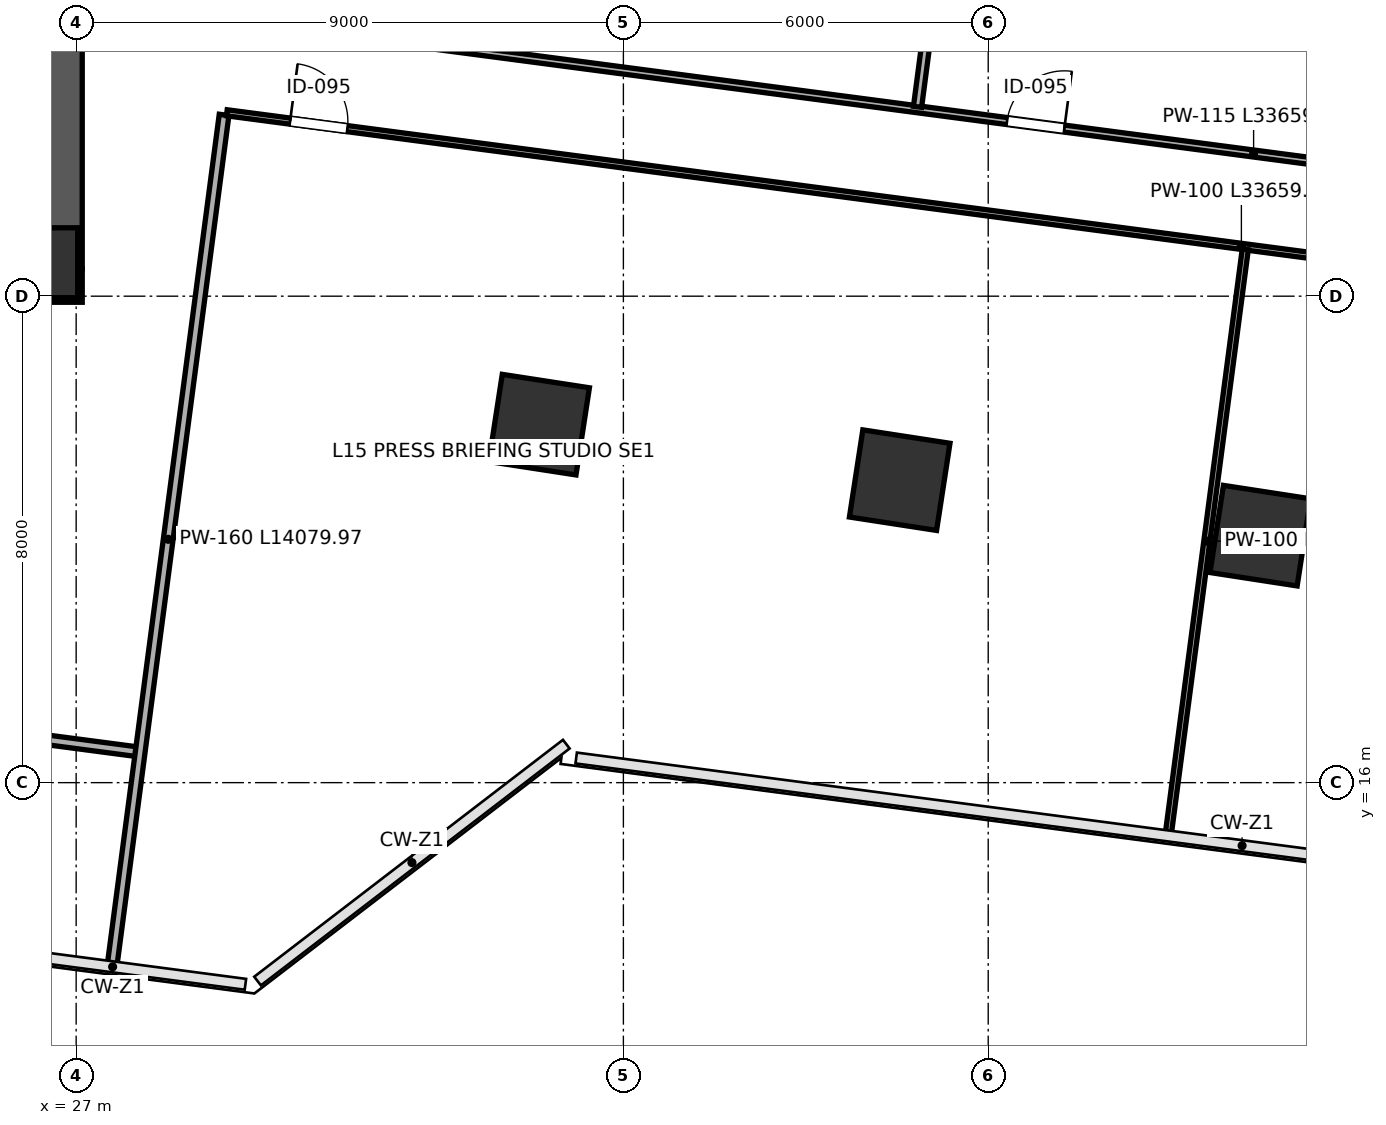
"""IFC4 building model, lengths in metres.
Left out: names, types, materials, properties, quantities, classifications, styles, units other than length and angle.
Written with IfcOpenShell. Run it as: python <this file> out.ifc"""

import sys

from ifc_helpers import new_model, si_unit, direction, frame, frame_2d, origin, origin_2d, place, context, subcontext, project, spatial, rectangle, extrude, clip, halfspace, source, transform, mapped, element, fill, save


model = new_model("IFC4")
c1 = context("Model", 3, precision=1e-05, world=origin(), true_north=direction((0.0, 1.0)))
c2 = subcontext(c1, "Body", "Model", "MODEL_VIEW")
j1 = project(units=[si_unit("LENGTHUNIT", "METRE"), si_unit("PLANEANGLEUNIT", "RADIAN")], contexts=[c1])
p1 = place(None, origin())
s1 = spatial("IfcSite", under=j1, at=p1, CompositionType="ELEMENT")
p2 = place(p1, origin())
s2 = spatial("IfcBuilding", under=s1, at=p2, CompositionType="ELEMENT")
p3 = place(p2, frame((0.0, 0.0, 70.6)))
s3 = spatial("IfcBuildingStorey", under=s2, at=p3, CompositionType="ELEMENT", Elevation=70.6)
m1 = source(origin(), c2, "Body", "SweptSolid", [
    extrude(rectangle(XDim=1.15, YDim=1.15, at=origin_2d()), origin(), (0.0, 0.0, 1.0), 4.198),
])
p4 = place(p3, frame((26.45, 24.55, 0.001), z_axis=(0.0, 0.0, 1.0), x_axis=(1.0, 0.0, 0.0)))
e1 = element("IfcColumn", 1, at=p4, inside=s3, PredefinedType="COLUMN", context=c2, shape_type="MappedRepresentation", body=[
    mapped(m1, transform((0.0, 0.0, 0.0), scale=1.0)),
])
p5 = place(p3, frame((34.614, 21.887, 0.0), z_axis=(-0.053108414123, -0.067297685072, 0.99631848218), x_axis=(-0.681975421827, 0.731258809044, 0.013041404074)))
e2 = element("IfcColumn", 2, at=p5, inside=s3, PredefinedType="COLUMN", context=c2, shape_type="Clipping", body=[
    clip(clip(extrude(rectangle(XDim=1.45, YDim=1.45, at=origin_2d()), origin(), (0.0, 0.0, 1.0), 4.216), halfspace(frame((0.0, 0.0, 0.072), z_axis=(0.0, 0.0, -1.0), x_axis=(1.0, 0.0, 0.0)), False)), halfspace(frame((0.0, 0.0, 4.144), z_axis=(0.0, 0.0, 1.0), x_axis=(1.0, 0.0, 0.0)), False)),
])
p6 = place(p3, frame((40.544, 20.975, 0.0), z_axis=(-0.057984263369, -0.097660746371, 0.993529166064), x_axis=(-0.772693676035, 0.634543900817, 0.017277758853)))
e3 = element("IfcColumn", 3, at=p6, inside=s3, PredefinedType="COLUMN", context=c2, shape_type="Clipping", body=[
    clip(clip(extrude(rectangle(XDim=1.45, YDim=1.45, at=origin_2d()), origin(), (0.0, 0.0, 1.0), 4.227), halfspace(frame((0.0, 0.0, 0.095), z_axis=(0.0, 0.0, -1.0), x_axis=(1.0, 0.0, 0.0)), False)), halfspace(frame((0.0, 0.0, 4.132), z_axis=(0.0, 0.0, 1.0), x_axis=(1.0, 0.0, 0.0)), False)),
])
p7 = place(p3, frame((46.475, 20.062, 0.0), z_axis=(-0.06277402471, -0.127676957682, 0.98982726589), x_axis=(-0.820518646619, 0.571209874027, 0.021643252166)))
e4 = element("IfcColumn", 4, at=p7, inside=s3, PredefinedType="COLUMN", context=c2, shape_type="Clipping", body=[
    clip(clip(extrude(rectangle(XDim=1.45, YDim=1.45, at=origin_2d()), origin(), (0.0, 0.0, 1.0), 4.243), halfspace(frame((0.0, 0.0, 0.12), z_axis=(0.0, 0.0, -1.0), x_axis=(1.0, 0.0, 0.0)), False)), halfspace(frame((0.0, 0.0, 4.124), z_axis=(0.0, 0.0, 1.0), x_axis=(1.0, 0.0, 0.0)), False)),
])
p8 = place(p3, frame((26.825, 24.45, 0.0), z_axis=(0.0, 0.0, 1.0), x_axis=(0.0, 1.0, 0.0)))
e5 = element("IfcWall", 5, at=p8, inside=s3, PredefinedType="SHEAR", context=c2, shape_type="SweptSolid", body=[
    extrude(rectangle(XDim=15.1, YDim=0.55, at=frame_2d((7.55, 0.0))), origin(), (0.0, 0.0, 1.0), 3.96),
])
p9 = place(p8, frame((8.6, 0.0, 0.0)))
e6 = element("IfcOpeningElement", 6, at=p9, cuts=e5, PredefinedType="OPENING", context=c2, shape_type="SweptSolid", body=[
    extrude(rectangle(XDim=1.15, YDim=2.2, at=frame_2d((0.575, 1.1))), frame((0.0, 0.285, 0.0), z_axis=(0.0, -1.0, 0.0), x_axis=(1.0, 0.0, 0.0)), (0.0, 0.0, 1.0), 0.57),
])
p10 = place(p3, frame((8.9, 24.175, 0.0), z_axis=(0.0, 0.0, 1.0), x_axis=(1.0, 0.0, 0.0)))
e7 = element("IfcWall", 7, at=p10, inside=s3, PredefinedType="SHEAR", context=c2, shape_type="SweptSolid", body=[
    extrude(rectangle(XDim=18.2, YDim=0.55, at=frame_2d((9.1, 0.0))), origin(), (0.0, 0.0, 1.0), 3.96),
])
p11 = place(p3, frame((10.376, 18.829, 0.0), z_axis=(0.0, 0.0, 1.0), x_axis=(0.99144504436, -0.130524802294, 0.0)))
e8 = element("IfcWall", 8, at=p11, inside=s3, PredefinedType="PARTITIONING", context=c2, shape_type="SweptSolid", body=[
    extrude(rectangle(XDim=17.79, YDim=0.16, at=frame_2d((8.895, 0.0))), origin(), (0.0, 0.0, 1.0), 3.96),
])
p12 = place(p11, frame((1.45, 0.0, 0.0)))
e9 = element("IfcOpeningElement", 9, at=p12, cuts=e8, PredefinedType="OPENING", context=c2, shape_type="SweptSolid", body=[
    extrude(rectangle(XDim=0.95, YDim=2.15, at=frame_2d((0.475, 1.075))), frame((0.0, 0.09, 0.0), z_axis=(0.0, -1.0, 0.0), x_axis=(1.0, 0.0, 0.0)), (0.0, 0.0, 1.0), 0.18),
])
p13 = place(p11, frame((10.5, 0.0, 0.0)))
e10 = element("IfcOpeningElement", 10, at=p13, cuts=e8, PredefinedType="OPENING", context=c2, shape_type="SweptSolid", body=[
    extrude(rectangle(XDim=0.95, YDim=2.15, at=frame_2d((0.475, 1.075))), frame((0.0, 0.09, 0.0), z_axis=(0.0, -1.0, 0.0), x_axis=(1.0, 0.0, 0.0)), (0.0, 0.0, 1.0), 0.18),
])
p14 = place(p3, frame((27.595, 13.022, 0.0), z_axis=(0.0, 0.0, 1.0), x_axis=(0.130532558102, 0.991444023269, 0.0)))
e11 = element("IfcWall", 11, at=p14, inside=s3, PredefinedType="PARTITIONING", context=c2, shape_type="SweptSolid", body=[
    extrude(rectangle(XDim=14.08, YDim=0.16, at=frame_2d((7.04, 0.0))), origin(), (0.0, 0.0, 1.0), 3.96),
])
p15 = place(p3, frame((29.679, 28.543, 0.0), z_axis=(0.0, 0.0, 1.0), x_axis=(0.991444714197, -0.130527310133, 0.0)))
e12 = element("IfcWall", 12, at=p15, inside=s3, PredefinedType="PARTITIONING", context=c2, shape_type="SweptSolid", body=[
    extrude(rectangle(XDim=33.66, YDim=0.115, at=frame_2d((16.83, 0.0))), origin(), (0.0, 0.0, 1.0), 3.095),
])
p16 = place(p15, frame((1.05, 0.0, 0.0)))
e13 = element("IfcOpeningElement", 13, at=p16, cuts=e12, PredefinedType="OPENING", context=c2, shape_type="SweptSolid", body=[
    extrude(rectangle(XDim=0.95, YDim=2.15, at=frame_2d((0.475, 1.075))), frame((0.0, 0.067, 0.0), z_axis=(0.0, -1.0, 0.0), x_axis=(1.0, 0.0, 0.0)), (0.0, 0.0, 1.0), 0.135),
])
p17 = place(p15, frame((12.74, 0.0, 0.0)))
e14 = element("IfcOpeningElement", 14, at=p17, cuts=e12, PredefinedType="OPENING", context=c2, shape_type="SweptSolid", body=[
    extrude(rectangle(XDim=0.95, YDim=2.15, at=frame_2d((0.475, 1.075))), frame((0.0, 0.067, 0.0), z_axis=(0.0, -1.0, 0.0), x_axis=(1.0, 0.0, 0.0)), (0.0, 0.0, 1.0), 0.135),
])
p18 = place(p15, frame((24.04, 0.0, 0.0)))
e15 = element("IfcOpeningElement", 15, at=p18, cuts=e12, PredefinedType="OPENING", context=c2, shape_type="SweptSolid", body=[
    extrude(rectangle(XDim=0.95, YDim=2.15, at=frame_2d((0.475, 1.075))), frame((0.0, 0.067, 0.0), z_axis=(0.0, -1.0, 0.0), x_axis=(1.0, 0.0, 0.0)), (0.0, 0.0, 1.0), 0.135),
])
p19 = place(p3, frame((29.478, 27.016, 0.0), z_axis=(0.0, 0.0, 1.0), x_axis=(0.991444590622, -0.130528248771, 0.0)))
e16 = element("IfcWall", 16, at=p19, inside=s3, PredefinedType="PARTITIONING", context=c2, shape_type="SweptSolid", body=[
    extrude(rectangle(XDim=33.66, YDim=0.1, at=frame_2d((16.83, 0.0))), origin(), (0.0, 0.0, 1.0), 3.095),
])
p20 = place(p19, frame((1.05, 0.0, 0.0)))
e17 = element("IfcOpeningElement", 17, at=p20, cuts=e16, PredefinedType="OPENING", context=c2, shape_type="SweptSolid", body=[
    extrude(rectangle(XDim=0.95, YDim=2.15, at=frame_2d((0.475, 1.075))), frame((0.0, 0.06, 0.0), z_axis=(0.0, -1.0, 0.0), x_axis=(1.0, 0.0, 0.0)), (0.0, 0.0, 1.0), 0.12),
])
p21 = place(p19, frame((18.39, 0.0, 0.0)))
e18 = element("IfcOpeningElement", 18, at=p21, cuts=e16, PredefinedType="OPENING", context=c2, shape_type="SweptSolid", body=[
    extrude(rectangle(XDim=0.95, YDim=2.15, at=frame_2d((0.475, 1.075))), frame((0.0, 0.06, 0.0), z_axis=(0.0, -1.0, 0.0), x_axis=(1.0, 0.0, 0.0)), (0.0, 0.0, 1.0), 0.12),
])
p22 = place(p3, frame((40.838, 27.114, 0.0), z_axis=(0.0, 0.0, 1.0), x_axis=(0.130538190585, 0.991443281685, 0.0)))
e19 = element("IfcWall", 19, at=p22, inside=s3, PredefinedType="PARTITIONING", context=c2, shape_type="SweptSolid", body=[
    extrude(rectangle(XDim=18.34, YDim=0.135, at=frame_2d((9.17, 0.0))), origin(), (0.0, 0.0, 1.0), 3.96),
])
p23 = place(p3, frame((44.964, 15.173, 0.0), z_axis=(0.0, 0.0, 1.0), x_axis=(0.130519754353, 0.991445708914, 0.0)))
e20 = element("IfcWall", 20, at=p23, inside=s3, PredefinedType="PARTITIONING", context=c2, shape_type="SweptSolid", body=[
    extrude(rectangle(XDim=9.68, YDim=0.1, at=frame_2d((4.84, 0.0))), origin(), (0.0, 0.0, 1.0), 3.96),
])
m2 = source(origin(), c2, "Body", "SweptSolid", [
    extrude(rectangle(XDim=0.95, YDim=2.15, at=frame_2d((0.475, 1.075))), frame((0.0, 0.025, 0.0), z_axis=(0.0, -1.0, 0.0), x_axis=(1.0, 0.0, 0.0)), (0.0, 0.0, 1.0), 0.05),
])
p24 = place(p17, origin())
e21 = element("IfcDoor", 21, at=p24, inside=s3, OperationType="SINGLE_SWING_RIGHT", PredefinedType="DOOR", context=c2, shape_type="MappedRepresentation", body=[
    mapped(m2, transform((0.0, 0.0, 0.0), scale=1.0)),
])
fill(e14, e21)
p25 = place(p20, origin())
e22 = element("IfcDoor", 22, at=p25, inside=s3, OperationType="SINGLE_SWING_LEFT", PredefinedType="DOOR", context=c2, shape_type="MappedRepresentation", body=[
    mapped(m2, transform((0.0, 0.0, 0.0), scale=1.0)),
])
fill(e17, e22)
save(model, sys.argv[1])
